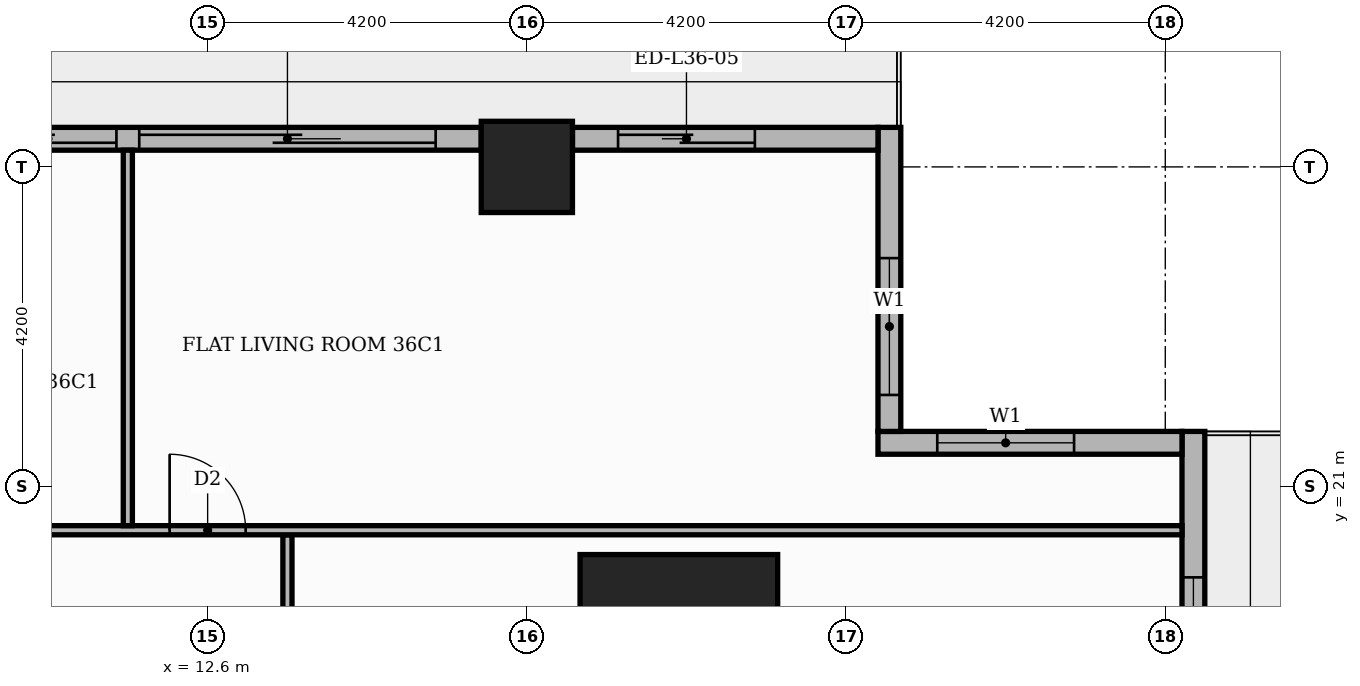
"""IFC4 building model, lengths in metres.
Left out: names, types, materials, properties, quantities, classifications, styles, units other than length and angle.
Written with IfcOpenShell. Run it as: python <this file> out.ifc"""

import sys

from ifc_helpers import new_model, si_unit, direction, frame, frame_2d, origin, origin_2d, place, context, subcontext, project, spatial, rectangle, extrude, element, fill, save


model = new_model("IFC4")
c1 = context("Model", 3, precision=1e-05, world=origin(), true_north=direction((0.0, 1.0)))
c2 = subcontext(c1, "Body", "Model", "MODEL_VIEW")
j1 = project(units=[si_unit("LENGTHUNIT", "METRE"), si_unit("PLANEANGLEUNIT", "RADIAN")], contexts=[c1])
p1 = place(None, origin())
s1 = spatial("IfcSite", under=j1, at=p1, CompositionType="ELEMENT")
p2 = place(p1, origin())
s2 = spatial("IfcBuilding", under=s1, at=p2, CompositionType="ELEMENT")
p3 = place(p2, frame((0.0, 0.0, 153.3)))
s3 = spatial("IfcBuildingStorey", under=s2, at=p3, CompositionType="ELEMENT", Elevation=153.3)
p4 = place(p3, frame((18.8, 18.8, 0.0), z_axis=(0.0, 0.0, 1.0), x_axis=(1.0, 0.0, 0.0)))
e1 = element("IfcColumn", 1, at=p4, inside=s3, PredefinedType="COLUMN", context=c2, shape_type="SweptSolid", body=[
    extrude(rectangle(XDim=2.6, YDim=2.6, at=origin_2d()), origin(), (0.0, 0.0, 1.0), 3.9),
])
p5 = place(p3, frame((16.8, 25.2, 0.0), z_axis=(0.0, 0.0, 1.0), x_axis=(1.0, 0.0, 0.0)))
e2 = element("IfcColumn", 2, at=p5, inside=s3, PredefinedType="COLUMN", context=c2, shape_type="SweptSolid", body=[
    extrude(rectangle(XDim=1.2, YDim=1.2, at=origin_2d()), origin(), (0.0, 0.0, 1.0), 3.9),
])
p6 = place(p3, frame((25.57, 17.4, 0.0), z_axis=(0.0, 0.0, 1.0), x_axis=(0.0, 1.0, 0.0)))
e3 = element("IfcWall", 3, at=p6, inside=s3, PredefinedType="STANDARD", context=c2, shape_type="SweptSolid", body=[
    extrude(rectangle(XDim=4.32, YDim=0.3, at=frame_2d((2.16, 0.0))), origin(), (0.0, 0.0, 1.0), 3.48),
])
p7 = place(p6, frame((0.6, 0.0, 0.9)))
e4 = element("IfcOpeningElement", 4, at=p7, cuts=e3, PredefinedType="OPENING", context=c2, shape_type="SweptSolid", body=[
    extrude(rectangle(XDim=1.8, YDim=2.1, at=frame_2d((0.9, 1.05))), frame((0.0, 0.16, 0.0), z_axis=(0.0, -1.0, 0.0), x_axis=(1.0, 0.0, 0.0)), (0.0, 0.0, 1.0), 0.32),
])
p8 = place(p3, frame((25.42, 21.57, 0.0), z_axis=(0.0, 0.0, 1.0), x_axis=(-1.0, 0.0, 0.0)))
e5 = element("IfcWall", 5, at=p8, inside=s3, PredefinedType="STANDARD", context=c2, shape_type="SweptSolid", body=[
    extrude(rectangle(XDim=4.0, YDim=0.3, at=frame_2d((2.0, 0.0))), origin(), (0.0, 0.0, 1.0), 3.48),
])
p9 = place(p8, frame((1.42, 0.0, 0.9)))
e6 = element("IfcOpeningElement", 6, at=p9, cuts=e5, PredefinedType="OPENING", context=c2, shape_type="SweptSolid", body=[
    extrude(rectangle(XDim=1.8, YDim=2.1, at=frame_2d((0.9, 1.05))), frame((0.0, 0.16, 0.0), z_axis=(0.0, -1.0, 0.0), x_axis=(1.0, 0.0, 0.0)), (0.0, 0.0, 1.0), 0.32),
])
p10 = place(p3, frame((21.57, 21.72, 0.0), z_axis=(0.0, 0.0, 1.0), x_axis=(0.0, 1.0, 0.0)))
e7 = element("IfcWall", 7, at=p10, inside=s3, PredefinedType="STANDARD", context=c2, shape_type="SweptSolid", body=[
    extrude(rectangle(XDim=4.0, YDim=0.3, at=frame_2d((2.0, 0.0))), origin(), (0.0, 0.0, 1.0), 3.48),
])
p11 = place(p10, frame((0.48, 0.0, 0.9)))
e8 = element("IfcOpeningElement", 8, at=p11, cuts=e7, PredefinedType="OPENING", context=c2, shape_type="SweptSolid", body=[
    extrude(rectangle(XDim=1.8, YDim=2.1, at=frame_2d((0.9, 1.05))), frame((0.0, 0.16, 0.0), z_axis=(0.0, -1.0, 0.0), x_axis=(1.0, 0.0, 0.0)), (0.0, 0.0, 1.0), 0.32),
])
p12 = place(p3, frame((21.42, 25.57, 0.0), z_axis=(0.0, 0.0, 1.0), x_axis=(-1.0, 0.0, 0.0)))
e9 = element("IfcWall", 9, at=p12, inside=s3, PredefinedType="STANDARD", context=c2, shape_type="SweptSolid", body=[
    extrude(rectangle(XDim=4.02, YDim=0.3, at=frame_2d((2.01, 0.0))), origin(), (0.0, 0.0, 1.0), 3.48),
])
p13 = place(p12, frame((1.62, 0.0, 0.0)))
e10 = element("IfcOpeningElement", 10, at=p13, cuts=e9, PredefinedType="OPENING", context=c2, shape_type="SweptSolid", body=[
    extrude(rectangle(XDim=1.8, YDim=2.4, at=frame_2d((0.9, 1.2))), frame((0.0, 0.16, 0.0), z_axis=(0.0, -1.0, 0.0), x_axis=(1.0, 0.0, 0.0)), (0.0, 0.0, 1.0), 0.32),
])
p14 = place(p3, frame((16.2, 25.57, 0.0), z_axis=(0.0, 0.0, 1.0), x_axis=(-1.0, 0.0, 0.0)))
e11 = element("IfcWall", 11, at=p14, inside=s3, PredefinedType="STANDARD", context=c2, shape_type="SweptSolid", body=[
    extrude(rectangle(XDim=7.2, YDim=0.3, at=frame_2d((3.6, 0.0))), origin(), (0.0, 0.0, 1.0), 3.48),
])
p15 = place(p14, frame((0.6, 0.0, 0.0)))
e12 = element("IfcOpeningElement", 12, at=p15, cuts=e11, PredefinedType="OPENING", context=c2, shape_type="SweptSolid", body=[
    extrude(rectangle(XDim=3.9, YDim=2.4, at=frame_2d((1.95, 1.2))), frame((0.0, 0.16, 0.0), z_axis=(0.0, -1.0, 0.0), x_axis=(1.0, 0.0, 0.0)), (0.0, 0.0, 1.0), 0.32),
])
p16 = place(p14, frame((4.8, 0.0, 0.0)))
e13 = element("IfcOpeningElement", 13, at=p16, cuts=e11, PredefinedType="OPENING", context=c2, shape_type="SweptSolid", body=[
    extrude(rectangle(XDim=1.8, YDim=2.4, at=frame_2d((0.9, 1.2))), frame((0.0, 0.16, 0.0), z_axis=(0.0, -1.0, 0.0), x_axis=(1.0, 0.0, 0.0)), (0.0, 0.0, 1.0), 0.32),
])
p17 = place(p3, frame((13.65, 13.75, 0.0), z_axis=(0.0, 0.0, 1.0), x_axis=(0.0, 1.0, 0.0)))
e14 = element("IfcWall", 14, at=p17, inside=s3, PredefinedType="PARTITIONING", context=c2, shape_type="SweptSolid", body=[
    extrude(rectangle(XDim=6.61, YDim=0.12, at=frame_2d((3.305, 0.0))), origin(), (0.0, 0.0, 1.0), 3.48),
])
p18 = place(p17, frame((2.835, 0.0, 0.0)))
e15 = element("IfcOpeningElement", 15, at=p18, cuts=e14, PredefinedType="OPENING", context=c2, shape_type="SweptSolid", body=[
    extrude(rectangle(XDim=0.9, YDim=2.1, at=frame_2d((0.45, 1.05))), frame((0.0, 0.07, 0.0), z_axis=(0.0, -1.0, 0.0), x_axis=(1.0, 0.0, 0.0)), (0.0, 0.0, 1.0), 0.14),
])
p19 = place(p3, frame((7.35, 20.42, 0.0), z_axis=(0.0, 0.0, 1.0), x_axis=(1.0, 0.0, 0.0)))
e16 = element("IfcWall", 16, at=p19, inside=s3, PredefinedType="PARTITIONING", context=c2, shape_type="SweptSolid", body=[
    extrude(rectangle(XDim=18.07, YDim=0.12, at=frame_2d((9.035, 0.0))), origin(), (0.0, 0.0, 1.0), 3.48),
])
p20 = place(p19, frame((4.75, 0.0, 0.0)))
e17 = element("IfcOpeningElement", 17, at=p20, cuts=e16, PredefinedType="OPENING", context=c2, shape_type="SweptSolid", body=[
    extrude(rectangle(XDim=1.0, YDim=2.1, at=frame_2d((0.5, 1.05))), frame((0.0, 0.07, 0.0), z_axis=(0.0, -1.0, 0.0), x_axis=(1.0, 0.0, 0.0)), (0.0, 0.0, 1.0), 0.14),
])
p21 = place(p19, frame((1.6, 0.0, 0.0)))
e18 = element("IfcOpeningElement", 18, at=p21, cuts=e16, PredefinedType="OPENING", context=c2, shape_type="SweptSolid", body=[
    extrude(rectangle(XDim=1.0, YDim=2.1, at=frame_2d((0.5, 1.05))), frame((0.0, 0.07, 0.0), z_axis=(0.0, -1.0, 0.0), x_axis=(1.0, 0.0, 0.0)), (0.0, 0.0, 1.0), 0.14),
])
p22 = place(p3, frame((11.55, 20.48, 0.0), z_axis=(0.0, 0.0, 1.0), x_axis=(0.0, 1.0, 0.0)))
e19 = element("IfcWall", 19, at=p22, inside=s3, PredefinedType="PARTITIONING", context=c2, shape_type="SweptSolid", body=[
    extrude(rectangle(XDim=4.94, YDim=0.12, at=frame_2d((2.47, 0.0))), origin(), (0.0, 0.0, 1.0), 3.48),
])
p23 = place(p7, origin())
e20 = element("IfcWindow", 20, at=p23, inside=s3, PartitioningType="SINGLE_PANEL", PredefinedType="WINDOW", context=c2, shape_type="SweptSolid", body=[
    extrude(rectangle(XDim=1.8, YDim=2.1, at=frame_2d((0.9, 1.05))), frame((0.0, 0.03, 0.0), z_axis=(0.0, -1.0, 0.0), x_axis=(1.0, 0.0, 0.0)), (0.0, 0.0, 1.0), 0.06),
])
fill(e4, e20)
p24 = place(p9, origin())
e21 = element("IfcWindow", 21, at=p24, inside=s3, PartitioningType="SINGLE_PANEL", PredefinedType="WINDOW", context=c2, shape_type="SweptSolid", body=[
    extrude(rectangle(XDim=1.8, YDim=2.1, at=frame_2d((0.9, 1.05))), frame((0.0, 0.03, 0.0), z_axis=(0.0, -1.0, 0.0), x_axis=(1.0, 0.0, 0.0)), (0.0, 0.0, 1.0), 0.06),
])
fill(e6, e21)
p25 = place(p11, origin())
e22 = element("IfcWindow", 22, at=p25, inside=s3, PartitioningType="SINGLE_PANEL", PredefinedType="WINDOW", context=c2, shape_type="SweptSolid", body=[
    extrude(rectangle(XDim=1.8, YDim=2.1, at=frame_2d((0.9, 1.05))), frame((0.0, 0.03, 0.0), z_axis=(0.0, -1.0, 0.0), x_axis=(1.0, 0.0, 0.0)), (0.0, 0.0, 1.0), 0.06),
])
fill(e8, e22)
p26 = place(p13, origin())
e23 = element("IfcDoor", 23, at=p26, inside=s3, OperationType="SLIDING_TO_RIGHT", PredefinedType="DOOR", context=c2, shape_type="SweptSolid", body=[
    extrude(rectangle(XDim=1.8, YDim=2.4, at=frame_2d((0.9, 1.2))), frame((0.0, 0.025, 0.0), z_axis=(0.0, -1.0, 0.0), x_axis=(1.0, 0.0, 0.0)), (0.0, 0.0, 1.0), 0.05),
])
fill(e10, e23)
p27 = place(p15, origin())
e24 = element("IfcDoor", 24, at=p27, inside=s3, OperationType="SLIDING_TO_LEFT", PredefinedType="DOOR", context=c2, shape_type="SweptSolid", body=[
    extrude(rectangle(XDim=3.9, YDim=2.4, at=frame_2d((1.95, 1.2))), frame((0.0, 0.025, 0.0), z_axis=(0.0, -1.0, 0.0), x_axis=(1.0, 0.0, 0.0)), (0.0, 0.0, 1.0), 0.05),
])
fill(e12, e24)
p28 = place(p16, origin())
e25 = element("IfcDoor", 25, at=p28, inside=s3, OperationType="SLIDING_TO_RIGHT", PredefinedType="DOOR", context=c2, shape_type="SweptSolid", body=[
    extrude(rectangle(XDim=1.8, YDim=2.4, at=frame_2d((0.9, 1.2))), frame((0.0, 0.025, 0.0), z_axis=(0.0, -1.0, 0.0), x_axis=(1.0, 0.0, 0.0)), (0.0, 0.0, 1.0), 0.05),
])
fill(e13, e25)
p29 = place(p20, origin())
e26 = element("IfcDoor", 26, at=p29, inside=s3, OperationType="SINGLE_SWING_LEFT", PredefinedType="DOOR", context=c2, shape_type="SweptSolid", body=[
    extrude(rectangle(XDim=1.0, YDim=2.1, at=frame_2d((0.5, 1.05))), frame((0.0, 0.025, 0.0), z_axis=(0.0, -1.0, 0.0), x_axis=(1.0, 0.0, 0.0)), (0.0, 0.0, 1.0), 0.05),
])
fill(e17, e26)
save(model, sys.argv[1])
